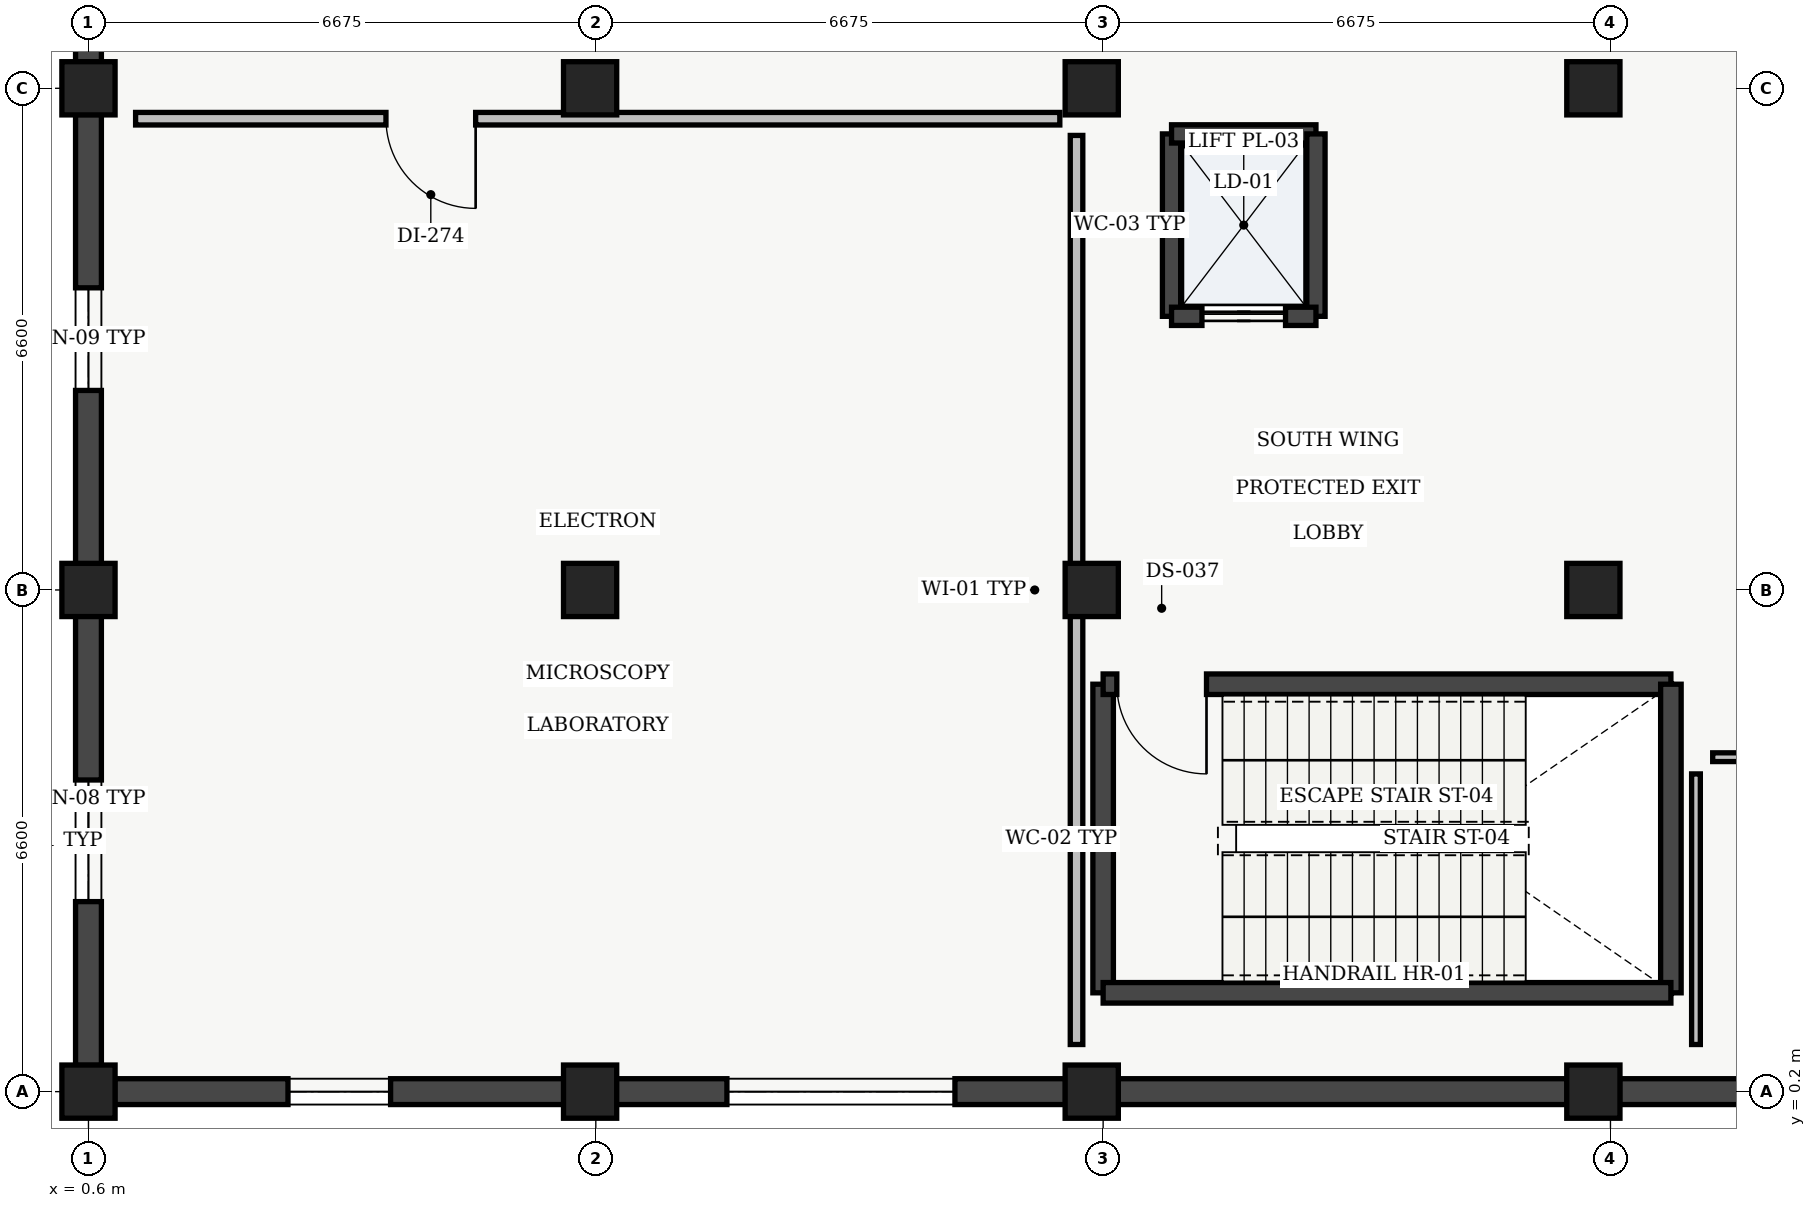
"""IFC4 building model, lengths in metres.
Left out: names, types, materials, properties, quantities, classifications, styles, units other than length and angle.
Written with IfcOpenShell. Run it as: python <this file> out.ifc"""

import sys

from ifc_helpers import new_model, si_unit, direction, frame, frame_2d, origin, origin_2d, place, context, subcontext, project, spatial, rectangle, extrude, element, fill, save


model = new_model("IFC4")
c1 = context("Model", 3, precision=1e-05, world=origin(), true_north=direction((0.0, 1.0)))
c2 = subcontext(c1, "Body", "Model", "MODEL_VIEW")
j1 = project(units=[si_unit("LENGTHUNIT", "METRE"), si_unit("PLANEANGLEUNIT", "RADIAN")], contexts=[c1])
p1 = place(None, origin())
s1 = spatial("IfcSite", under=j1, at=p1, CompositionType="ELEMENT")
p2 = place(p1, origin())
s2 = spatial("IfcBuilding", under=s1, at=p2, CompositionType="ELEMENT")
p3 = place(p2, origin())
s3 = spatial("IfcBuildingStorey", under=s2, at=p3, CompositionType="ELEMENT", Elevation=0.0)
for number, where, z_axis, x_axis in (
    (1, (0.6, 0.2, 0.0), (0.0, 0.0, 1.0), (1.0, 0.0, 0.0)),
    (2, (0.6, 6.8, 0.0), (0.0, 0.0, 1.0), (1.0, 0.0, 0.0)),
    (3, (0.6, 13.4, 0.0), (0.0, 0.0, 1.0), (1.0, 0.0, 0.0)),
    (4, (7.2, 0.2, 0.0), (0.0, 0.0, 1.0), (1.0, 0.0, 0.0)),
    (5, (7.2, 6.8, 0.0), (0.0, 0.0, 1.0), (1.0, 0.0, 0.0)),
    (6, (7.2, 13.4, 0.0), (0.0, 0.0, 1.0), (1.0, 0.0, 0.0)),
    (7, (13.8, 0.2, 0.0), (0.0, 0.0, 1.0), (1.0, 0.0, 0.0)),
    (8, (13.8, 6.8, 0.0), (0.0, 0.0, 1.0), (1.0, 0.0, 0.0)),
    (9, (13.8, 13.4, 0.0), (0.0, 0.0, 1.0), (1.0, 0.0, 0.0)),
    (10, (20.4, 0.2, 0.0), (0.0, 0.0, 1.0), (1.0, 0.0, 0.0)),
    (11, (20.4, 6.8, 0.0), (0.0, 0.0, 1.0), (1.0, 0.0, 0.0)),
    (12, (20.4, 13.4, 0.0), (0.0, 0.0, 1.0), (1.0, 0.0, 0.0)),
):
    element("IfcColumn", number, at=place(p3, frame(where, z_axis=z_axis, x_axis=x_axis)), inside=s3, PredefinedType="COLUMN", context=c2, shape_type="SweptSolid", body=[
        extrude(rectangle(XDim=0.7, YDim=0.7, at=origin_2d()), origin(), (0.0, 0.0, 1.0), 4.88),
    ])
p4 = place(p3, frame((0.6, 0.545, 0.0), z_axis=(0.0, 0.0, 1.0), x_axis=(0.0, 1.0, 0.0)))
e13 = element("IfcWall", 13, at=p4, inside=s3, PredefinedType="SOLIDWALL", context=c2, shape_type="SweptSolid", body=[
    extrude(rectangle(XDim=5.91, YDim=0.34, at=frame_2d((2.955, 0.0))), origin(), (0.0, 0.0, 1.0), 4.415),
])
p5 = place(p4, frame((2.155, 0.0, 0.95)))
e14 = element("IfcOpeningElement", 14, at=p5, cuts=e13, PredefinedType="OPENING", context=c2, shape_type="SweptSolid", body=[
    extrude(rectangle(XDim=1.6, YDim=1.4, at=frame_2d((0.8, 0.7))), frame((0.0, 0.17, 0.0), z_axis=(0.0, -1.0, 0.0), x_axis=(1.0, 0.0, 0.0)), (0.0, 0.0, 1.0), 0.34),
])
p6 = place(p3, frame((0.6, 7.145, 0.0), z_axis=(0.0, 0.0, 1.0), x_axis=(0.0, 1.0, 0.0)))
e15 = element("IfcWall", 15, at=p6, inside=s3, PredefinedType="SOLIDWALL", context=c2, shape_type="SweptSolid", body=[
    extrude(rectangle(XDim=5.91, YDim=0.34, at=frame_2d((2.955, 0.0))), origin(), (0.0, 0.0, 1.0), 4.415),
])
p7 = place(p6, frame((2.28, 0.0, 0.95)))
e16 = element("IfcOpeningElement", 16, at=p7, cuts=e15, PredefinedType="OPENING", context=c2, shape_type="SweptSolid", body=[
    extrude(rectangle(XDim=1.35, YDim=1.8, at=frame_2d((0.675, 0.9))), frame((0.0, 0.17, 0.0), z_axis=(0.0, -1.0, 0.0), x_axis=(1.0, 0.0, 0.0)), (0.0, 0.0, 1.0), 0.34),
])
p8 = place(p3, frame((0.6, 13.745, 0.0), z_axis=(0.0, 0.0, 1.0), x_axis=(0.0, 1.0, 0.0)))
e17 = element("IfcWall", 17, at=p8, inside=s3, PredefinedType="SOLIDWALL", context=c2, shape_type="SweptSolid", body=[
    extrude(rectangle(XDim=5.91, YDim=0.34, at=frame_2d((2.955, 0.0))), origin(), (0.0, 0.0, 1.0), 4.415),
])
p9 = place(p8, frame((1.155, 0.0, 0.0)))
e18 = element("IfcOpeningElement", 18, at=p9, cuts=e17, PredefinedType="OPENING", context=c2, shape_type="SweptSolid", body=[
    extrude(rectangle(XDim=3.6, YDim=2.65, at=frame_2d((1.8, 1.325))), frame((0.0, 0.17, 0.0), z_axis=(0.0, -1.0, 0.0), x_axis=(1.0, 0.0, 0.0)), (0.0, 0.0, 1.0), 0.34),
])
p10 = place(p3, frame((26.655, 0.2, 0.0), z_axis=(0.0, 0.0, 1.0), x_axis=(-1.0, 0.0, 0.0)))
e19 = element("IfcWall", 19, at=p10, inside=s3, PredefinedType="SOLIDWALL", context=c2, shape_type="SweptSolid", body=[
    extrude(rectangle(XDim=5.91, YDim=0.34, at=frame_2d((2.955, 0.0))), origin(), (0.0, 0.0, 1.0), 4.415),
])
p11 = place(p10, frame((1.98, 0.0, 0.95)))
e20 = element("IfcOpeningElement", 20, at=p11, cuts=e19, PredefinedType="OPENING", context=c2, shape_type="SweptSolid", body=[
    extrude(rectangle(XDim=1.95, YDim=1.5, at=frame_2d((0.975, 0.75))), frame((0.0, 0.17, 0.0), z_axis=(0.0, -1.0, 0.0), x_axis=(1.0, 0.0, 0.0)), (0.0, 0.0, 1.0), 0.34),
])
p12 = place(p3, frame((20.055, 0.2, 0.0), z_axis=(0.0, 0.0, 1.0), x_axis=(-1.0, 0.0, 0.0)))
e21 = element("IfcWall", 21, at=p12, inside=s3, PredefinedType="SOLIDWALL", context=c2, shape_type="SweptSolid", body=[
    extrude(rectangle(XDim=5.91, YDim=0.34, at=frame_2d((2.955, 0.0))), origin(), (0.0, 0.0, 1.0), 4.415),
])
p13 = place(p3, frame((13.455, 0.2, 0.0), z_axis=(0.0, 0.0, 1.0), x_axis=(-1.0, 0.0, 0.0)))
e22 = element("IfcWall", 22, at=p13, inside=s3, PredefinedType="SOLIDWALL", context=c2, shape_type="SweptSolid", body=[
    extrude(rectangle(XDim=5.91, YDim=0.34, at=frame_2d((2.955, 0.0))), origin(), (0.0, 0.0, 1.0), 4.415),
])
p14 = place(p13, frame((1.455, 0.0, 0.95)))
e23 = element("IfcOpeningElement", 23, at=p14, cuts=e22, PredefinedType="OPENING", context=c2, shape_type="SweptSolid", body=[
    extrude(rectangle(XDim=3.0, YDim=1.65, at=frame_2d((1.5, 0.825))), frame((0.0, 0.17, 0.0), z_axis=(0.0, -1.0, 0.0), x_axis=(1.0, 0.0, 0.0)), (0.0, 0.0, 1.0), 0.34),
])
p15 = place(p3, frame((6.855, 0.2, 0.0), z_axis=(0.0, 0.0, 1.0), x_axis=(-1.0, 0.0, 0.0)))
e24 = element("IfcWall", 24, at=p15, inside=s3, PredefinedType="SOLIDWALL", context=c2, shape_type="SweptSolid", body=[
    extrude(rectangle(XDim=5.91, YDim=0.34, at=frame_2d((2.955, 0.0))), origin(), (0.0, 0.0, 1.0), 4.415),
])
p16 = place(p15, frame((2.28, 0.0, 0.95)))
e25 = element("IfcOpeningElement", 25, at=p16, cuts=e24, PredefinedType="OPENING", context=c2, shape_type="SweptSolid", body=[
    extrude(rectangle(XDim=1.35, YDim=1.8, at=frame_2d((0.675, 0.9))), frame((0.0, 0.17, 0.0), z_axis=(0.0, -1.0, 0.0), x_axis=(1.0, 0.0, 0.0)), (0.0, 0.0, 1.0), 0.34),
])
p17 = place(p3, frame((13.95, 1.5, 0.0), z_axis=(0.0, 0.0, 1.0), x_axis=(0.0, 1.0, 0.0)))
e26 = element("IfcWall", 26, at=p17, inside=s3, PredefinedType="SHEAR", context=c2, shape_type="SweptSolid", body=[
    extrude(rectangle(XDim=4.06, YDim=0.27, at=frame_2d((2.03, 0.0))), origin(), (0.0, 0.0, 1.0), 4.88),
])
p18 = place(p3, frame((13.95, 5.56, 0.0), z_axis=(0.0, 0.0, 1.0), x_axis=(1.0, 0.0, 0.0)))
e27 = element("IfcWall", 27, at=p18, inside=s3, PredefinedType="SHEAR", context=c2, shape_type="SweptSolid", body=[
    extrude(rectangle(XDim=7.47, YDim=0.27, at=frame_2d((3.735, 0.0))), origin(), (0.0, 0.0, 1.0), 4.88),
])
p19 = place(p18, frame((0.18, 0.0, 0.0)))
e28 = element("IfcOpeningElement", 28, at=p19, cuts=e27, PredefinedType="OPENING", context=c2, shape_type="SweptSolid", body=[
    extrude(rectangle(XDim=1.18, YDim=2.15, at=frame_2d((0.59, 1.075))), frame((0.0, 0.135, 0.0), z_axis=(0.0, -1.0, 0.0), x_axis=(1.0, 0.0, 0.0)), (0.0, 0.0, 1.0), 0.27),
])
p20 = place(p3, frame((21.42, 5.56, 0.0), z_axis=(0.0, 0.0, 1.0), x_axis=(0.0, -1.0, 0.0)))
e29 = element("IfcWall", 29, at=p20, inside=s3, PredefinedType="SHEAR", context=c2, shape_type="SweptSolid", body=[
    extrude(rectangle(XDim=4.06, YDim=0.27, at=frame_2d((2.03, 0.0))), origin(), (0.0, 0.0, 1.0), 4.88),
])
p21 = place(p3, frame((21.42, 1.5, 0.0), z_axis=(0.0, 0.0, 1.0), x_axis=(-1.0, 0.0, 0.0)))
e30 = element("IfcWall", 30, at=p21, inside=s3, PredefinedType="SHEAR", context=c2, shape_type="SweptSolid", body=[
    extrude(rectangle(XDim=7.47, YDim=0.27, at=frame_2d((3.735, 0.0))), origin(), (0.0, 0.0, 1.0), 4.88),
])
p22 = place(p3, frame((14.85, 10.4, 0.0), z_axis=(0.0, 0.0, 1.0), x_axis=(0.0, 1.0, 0.0)))
e31 = element("IfcWall", 31, at=p22, inside=s3, PredefinedType="SHEAR", context=c2, shape_type="SweptSolid", body=[
    extrude(rectangle(XDim=2.4, YDim=0.24, at=frame_2d((1.2, 0.0))), origin(), (0.0, 0.0, 1.0), 4.88),
])
p23 = place(p3, frame((14.85, 12.8, 0.0), z_axis=(0.0, 0.0, 1.0), x_axis=(1.0, 0.0, 0.0)))
e32 = element("IfcWall", 32, at=p23, inside=s3, PredefinedType="SHEAR", context=c2, shape_type="SweptSolid", body=[
    extrude(rectangle(XDim=1.9, YDim=0.24, at=frame_2d((0.95, 0.0))), origin(), (0.0, 0.0, 1.0), 4.88),
])
p24 = place(p3, frame((16.75, 12.8, 0.0), z_axis=(0.0, 0.0, 1.0), x_axis=(0.0, -1.0, 0.0)))
e33 = element("IfcWall", 33, at=p24, inside=s3, PredefinedType="SHEAR", context=c2, shape_type="SweptSolid", body=[
    extrude(rectangle(XDim=2.4, YDim=0.24, at=frame_2d((1.2, 0.0))), origin(), (0.0, 0.0, 1.0), 4.88),
])
p25 = place(p3, frame((16.75, 10.4, 0.0), z_axis=(0.0, 0.0, 1.0), x_axis=(-1.0, 0.0, 0.0)))
e34 = element("IfcWall", 34, at=p25, inside=s3, PredefinedType="SHEAR", context=c2, shape_type="SweptSolid", body=[
    extrude(rectangle(XDim=1.9, YDim=0.24, at=frame_2d((0.95, 0.0))), origin(), (0.0, 0.0, 1.0), 4.88),
])
p26 = place(p25, frame((0.4, 0.0, 0.0)))
e35 = element("IfcOpeningElement", 35, at=p26, cuts=e34, PredefinedType="OPENING", context=c2, shape_type="SweptSolid", body=[
    extrude(rectangle(XDim=1.1, YDim=2.2, at=frame_2d((0.55, 1.1))), frame((0.0, 0.12, 0.0), z_axis=(0.0, -1.0, 0.0), x_axis=(1.0, 0.0, 0.0)), (0.0, 0.0, 1.0), 0.24),
])
p27 = place(p3, frame((24.53, 4.6, 0.0), z_axis=(0.0, 0.0, 1.0), x_axis=(-1.0, 0.0, 0.0)))
e36 = element("IfcWall", 36, at=p27, inside=s3, PredefinedType="PARTITIONING", context=c2, shape_type="SweptSolid", body=[
    extrude(rectangle(XDim=2.56, YDim=0.115, at=frame_2d((1.28, 0.0))), origin(), (0.0, 0.0, 1.0), 4.55),
])
p28 = place(p27, frame((0.83, 0.0, 0.0)))
e37 = element("IfcOpeningElement", 37, at=p28, cuts=e36, PredefinedType="OPENING", context=c2, shape_type="SweptSolid", body=[
    extrude(rectangle(XDim=0.9, YDim=2.1, at=frame_2d((0.45, 1.05))), frame((0.0, 0.058, 0.0), z_axis=(0.0, -1.0, 0.0), x_axis=(1.0, 0.0, 0.0)), (0.0, 0.0, 1.0), 0.115),
])
p29 = place(p3, frame((21.75, 4.38, 0.0), z_axis=(0.0, 0.0, 1.0), x_axis=(0.0, -1.0, 0.0)))
e38 = element("IfcWall", 38, at=p29, inside=s3, PredefinedType="PARTITIONING", context=c2, shape_type="SweptSolid", body=[
    extrude(rectangle(XDim=3.56, YDim=0.115, at=frame_2d((1.78, 0.0))), origin(), (0.0, 0.0, 1.0), 4.55),
])
p30 = place(p3, frame((13.6, 0.82, 0.0), z_axis=(0.0, 0.0, 1.0), x_axis=(0.0, 1.0, 0.0)))
e39 = element("IfcWall", 39, at=p30, inside=s3, PredefinedType="PARTITIONING", context=c2, shape_type="SweptSolid", body=[
    extrude(rectangle(XDim=11.96, YDim=0.165, at=frame_2d((5.98, 0.0))), origin(), (0.0, 0.0, 1.0), 4.215),
])
p31 = place(p3, frame((13.38, 13.0, 0.0), z_axis=(0.0, 0.0, 1.0), x_axis=(-1.0, 0.0, 0.0)))
e40 = element("IfcWall", 40, at=p31, inside=s3, PredefinedType="PARTITIONING", context=c2, shape_type="SweptSolid", body=[
    extrude(rectangle(XDim=12.16, YDim=0.165, at=frame_2d((6.08, 0.0))), origin(), (0.0, 0.0, 1.0), 4.55),
])
p32 = place(p31, frame((7.686, 0.0, 0.0)))
e41 = element("IfcOpeningElement", 41, at=p32, cuts=e40, PredefinedType="OPENING", context=c2, shape_type="SweptSolid", body=[
    extrude(rectangle(XDim=1.18, YDim=2.14, at=frame_2d((0.59, 1.07))), frame((0.0, 0.083, 0.0), z_axis=(0.0, -1.0, 0.0), x_axis=(1.0, 0.0, 0.0)), (0.0, 0.0, 1.0), 0.165),
])
p33 = place(p5, origin())
e42 = element("IfcWindow", 42, at=p33, inside=s3, PartitioningType="SINGLE_PANEL", PredefinedType="WINDOW", context=c2, shape_type="SweptSolid", body=[
    extrude(rectangle(XDim=1.6, YDim=1.4, at=frame_2d((0.8, 0.7))), frame((0.0, 0.03, 0.0), z_axis=(0.0, -1.0, 0.0), x_axis=(1.0, 0.0, 0.0)), (0.0, 0.0, 1.0), 0.06),
])
fill(e14, e42)
p34 = place(p7, origin())
e43 = element("IfcWindow", 43, at=p34, inside=s3, PartitioningType="SINGLE_PANEL", PredefinedType="WINDOW", context=c2, shape_type="SweptSolid", body=[
    extrude(rectangle(XDim=1.35, YDim=1.8, at=frame_2d((0.675, 0.9))), frame((0.0, 0.03, 0.0), z_axis=(0.0, -1.0, 0.0), x_axis=(1.0, 0.0, 0.0)), (0.0, 0.0, 1.0), 0.06),
])
fill(e16, e43)
p35 = place(p14, origin())
e44 = element("IfcWindow", 44, at=p35, inside=s3, PartitioningType="SINGLE_PANEL", PredefinedType="WINDOW", context=c2, shape_type="SweptSolid", body=[
    extrude(rectangle(XDim=3.0, YDim=1.65, at=frame_2d((1.5, 0.825))), frame((0.0, 0.03, 0.0), z_axis=(0.0, -1.0, 0.0), x_axis=(1.0, 0.0, 0.0)), (0.0, 0.0, 1.0), 0.06),
])
fill(e23, e44)
p36 = place(p16, origin())
e45 = element("IfcWindow", 45, at=p36, inside=s3, PartitioningType="SINGLE_PANEL", PredefinedType="WINDOW", context=c2, shape_type="SweptSolid", body=[
    extrude(rectangle(XDim=1.35, YDim=1.8, at=frame_2d((0.675, 0.9))), frame((0.0, 0.03, 0.0), z_axis=(0.0, -1.0, 0.0), x_axis=(1.0, 0.0, 0.0)), (0.0, 0.0, 1.0), 0.06),
])
fill(e25, e45)
p37 = place(p19, origin())
e46 = element("IfcDoor", 46, at=p37, inside=s3, OperationType="SINGLE_SWING_RIGHT", PredefinedType="DOOR", context=c2, shape_type="SweptSolid", body=[
    extrude(rectangle(XDim=1.18, YDim=2.15, at=frame_2d((0.59, 1.075))), frame((0.0, 0.025, 0.0), z_axis=(0.0, -1.0, 0.0), x_axis=(1.0, 0.0, 0.0)), (0.0, 0.0, 1.0), 0.05),
])
fill(e28, e46)
p38 = place(p26, origin())
e47 = element("IfcDoor", 47, at=p38, inside=s3, OperationType="SLIDING_TO_LEFT", PredefinedType="DOOR", context=c2, shape_type="SweptSolid", body=[
    extrude(rectangle(XDim=1.1, YDim=2.2, at=frame_2d((0.55, 1.1))), frame((0.0, 0.025, 0.0), z_axis=(0.0, -1.0, 0.0), x_axis=(1.0, 0.0, 0.0)), (0.0, 0.0, 1.0), 0.05),
])
fill(e35, e47)
p39 = place(p32, origin())
e48 = element("IfcDoor", 48, at=p39, inside=s3, OperationType="SINGLE_SWING_LEFT", PredefinedType="DOOR", context=c2, shape_type="SweptSolid", body=[
    extrude(rectangle(XDim=1.18, YDim=2.14, at=frame_2d((0.59, 1.07))), frame((0.0, 0.025, 0.0), z_axis=(0.0, -1.0, 0.0), x_axis=(1.0, 0.0, 0.0)), (0.0, 0.0, 1.0), 0.05),
])
fill(e41, e48)
save(model, sys.argv[1])
